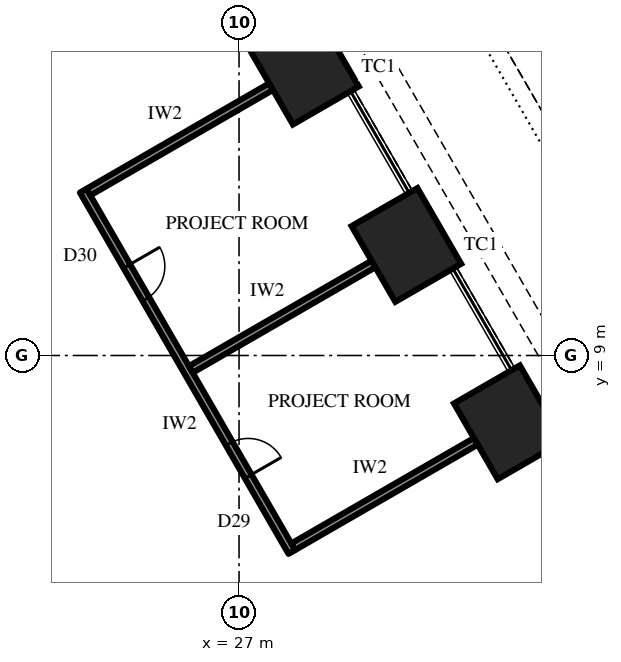
"""IFC4 building model, lengths in metres.
Left out: names, types, materials, properties, quantities, classifications, styles, units other than length and angle.
Written with IfcOpenShell. Run it as: python <this file> out.ifc"""

import sys

from ifc_helpers import new_model, si_unit, direction, frame, frame_2d, origin, origin_2d, place, context, subcontext, project, spatial, rectangle, extrude, element, fill, save


model = new_model("IFC4")
c1 = context("Model", 3, precision=1e-05, world=origin(), true_north=direction((0.0, 1.0)))
c2 = subcontext(c1, "Body", "Model", "MODEL_VIEW")
j1 = project(units=[si_unit("LENGTHUNIT", "METRE"), si_unit("PLANEANGLEUNIT", "RADIAN")], contexts=[c1])
p1 = place(None, origin())
s1 = spatial("IfcSite", under=j1, at=p1, CompositionType="ELEMENT")
p2 = place(p1, origin())
s2 = spatial("IfcBuilding", under=s1, at=p2, CompositionType="ELEMENT")
p3 = place(p2, frame((0.0, 0.0, 23.5)))
s3 = spatial("IfcBuildingStorey", under=s2, at=p3, CompositionType="ELEMENT", Elevation=23.5)
for number, where, z_axis, x_axis in (
    (1, (34.097, 7.242, 0.0), (0.0, 0.0, 1.0), (-0.5, 0.866, 0.0)),
    (2, (31.403, 11.908, 0.0), (0.0, 0.0, 1.0), (-0.5, 0.866, 0.0)),
    (3, (28.709, 16.575, 0.0), (0.0, 0.0, 1.0), (-0.5, 0.866, 0.0)),
):
    element("IfcColumn", number, at=place(p3, frame(where, z_axis=z_axis, x_axis=x_axis)), inside=s3, PredefinedType="COLUMN", context=c2, shape_type="SweptSolid", body=[
        extrude(rectangle(XDim=2.3, YDim=2.0, at=origin_2d()), origin(), (0.0, 0.0, 1.0), 4.2),
    ])
p4 = place(p3, frame((50.72, 3.95, 0.0), z_axis=(0.0, 0.0, 1.0), x_axis=(-0.499998269459, 0.86602640291, 0.0)))
e4 = element("IfcWall", 4, at=p4, inside=s3, PredefinedType="PARAPET", context=c2, shape_type="SweptSolid", body=[
    extrude(rectangle(XDim=43.879, YDim=0.2, at=frame_2d((21.939, 0.0))), origin(), (0.0, 0.0, 1.0), 1.2),
])
p5 = place(p3, frame((28.388, 3.83, 0.0), z_axis=(0.0, 0.0, 1.0), x_axis=(-0.499992624997, 0.866029661703, 0.0)))
e5 = element("IfcWall", 5, at=p5, inside=s3, PredefinedType="PARTITIONING", context=c2, shape_type="SweptSolid", body=[
    extrude(rectangle(XDim=10.977, YDim=0.2, at=frame_2d((5.489, 0.0))), origin(), (0.0, 0.0, 1.0), 4.0),
])
p6 = place(p5, frame((2.294, 0.0, 0.0)))
e6 = element("IfcOpeningElement", 6, at=p6, cuts=e5, PredefinedType="OPENING", context=c2, shape_type="SweptSolid", body=[
    extrude(rectangle(XDim=1.0, YDim=2.2, at=frame_2d((0.5, 1.1))), frame((0.0, 0.11, 0.0), z_axis=(0.0, -1.0, 0.0), x_axis=(1.0, 0.0, 0.0)), (0.0, 0.0, 1.0), 0.22),
])
p7 = place(p5, frame((7.683, 0.0, 0.0)))
e7 = element("IfcOpeningElement", 7, at=p7, cuts=e5, PredefinedType="OPENING", context=c2, shape_type="SweptSolid", body=[
    extrude(rectangle(XDim=1.0, YDim=2.2, at=frame_2d((0.5, 1.1))), frame((0.0, 0.11, 0.0), z_axis=(0.0, -1.0, 0.0), x_axis=(1.0, 0.0, 0.0)), (0.0, 0.0, 1.0), 0.22),
])
p8 = place(p3, frame((28.425, 3.967, 0.0), z_axis=(0.0, 0.0, 1.0), x_axis=(0.866011969997, 0.500023267281, 0.0)))
e8 = element("IfcWall", 8, at=p8, inside=s3, PredefinedType="PARTITIONING", context=c2, shape_type="SweptSolid", body=[
    extrude(rectangle(XDim=5.55, YDim=0.2, at=frame_2d((2.775, 0.0))), origin(), (0.0, 0.0, 1.0), 2.944),
])
p9 = place(p3, frame((25.73, 8.633, 0.0), z_axis=(0.0, 0.0, 1.0), x_axis=(0.866022967649, 0.500004219487, 0.0)))
e9 = element("IfcWall", 9, at=p9, inside=s3, PredefinedType="PARTITIONING", context=c2, shape_type="SweptSolid", body=[
    extrude(rectangle(XDim=5.55, YDim=0.2, at=frame_2d((2.775, 0.0))), origin(), (0.0, 0.0, 1.0), 2.944),
])
p10 = place(p3, frame((23.036, 13.3, 0.0), z_axis=(0.0, 0.0, 1.0), x_axis=(0.866031018186, 0.499990275446, 0.0)))
e10 = element("IfcWall", 10, at=p10, inside=s3, PredefinedType="PARTITIONING", context=c2, shape_type="SweptSolid", body=[
    extrude(rectangle(XDim=5.55, YDim=0.2, at=frame_2d((2.775, 0.0))), origin(), (0.0, 0.0, 1.0), 4.0),
])
p11 = place(p6, frame((1.0, 0.0, 0.0), z_axis=(0.0, 0.0, 1.0), x_axis=(-1.0, 0.0, 0.0)))
e11 = element("IfcDoor", 11, at=p11, inside=s3, OperationType="SINGLE_SWING_LEFT", PredefinedType="DOOR", context=c2, shape_type="SweptSolid", body=[
    extrude(rectangle(XDim=1.0, YDim=2.2, at=frame_2d((0.5, 1.1))), frame((0.0, 0.025, 0.0), z_axis=(0.0, -1.0, 0.0), x_axis=(1.0, 0.0, 0.0)), (0.0, 0.0, 1.0), 0.05),
])
fill(e6, e11)
p12 = place(p7, frame((1.0, 0.0, 0.0), z_axis=(0.0, 0.0, 1.0), x_axis=(-1.0, 0.0, 0.0)))
e12 = element("IfcDoor", 12, at=p12, inside=s3, OperationType="SINGLE_SWING_RIGHT", PredefinedType="DOOR", context=c2, shape_type="SweptSolid", body=[
    extrude(rectangle(XDim=1.0, YDim=2.2, at=frame_2d((0.5, 1.1))), frame((0.0, 0.025, 0.0), z_axis=(0.0, -1.0, 0.0), x_axis=(1.0, 0.0, 0.0)), (0.0, 0.0, 1.0), 0.05),
])
fill(e7, e12)
save(model, sys.argv[1])
